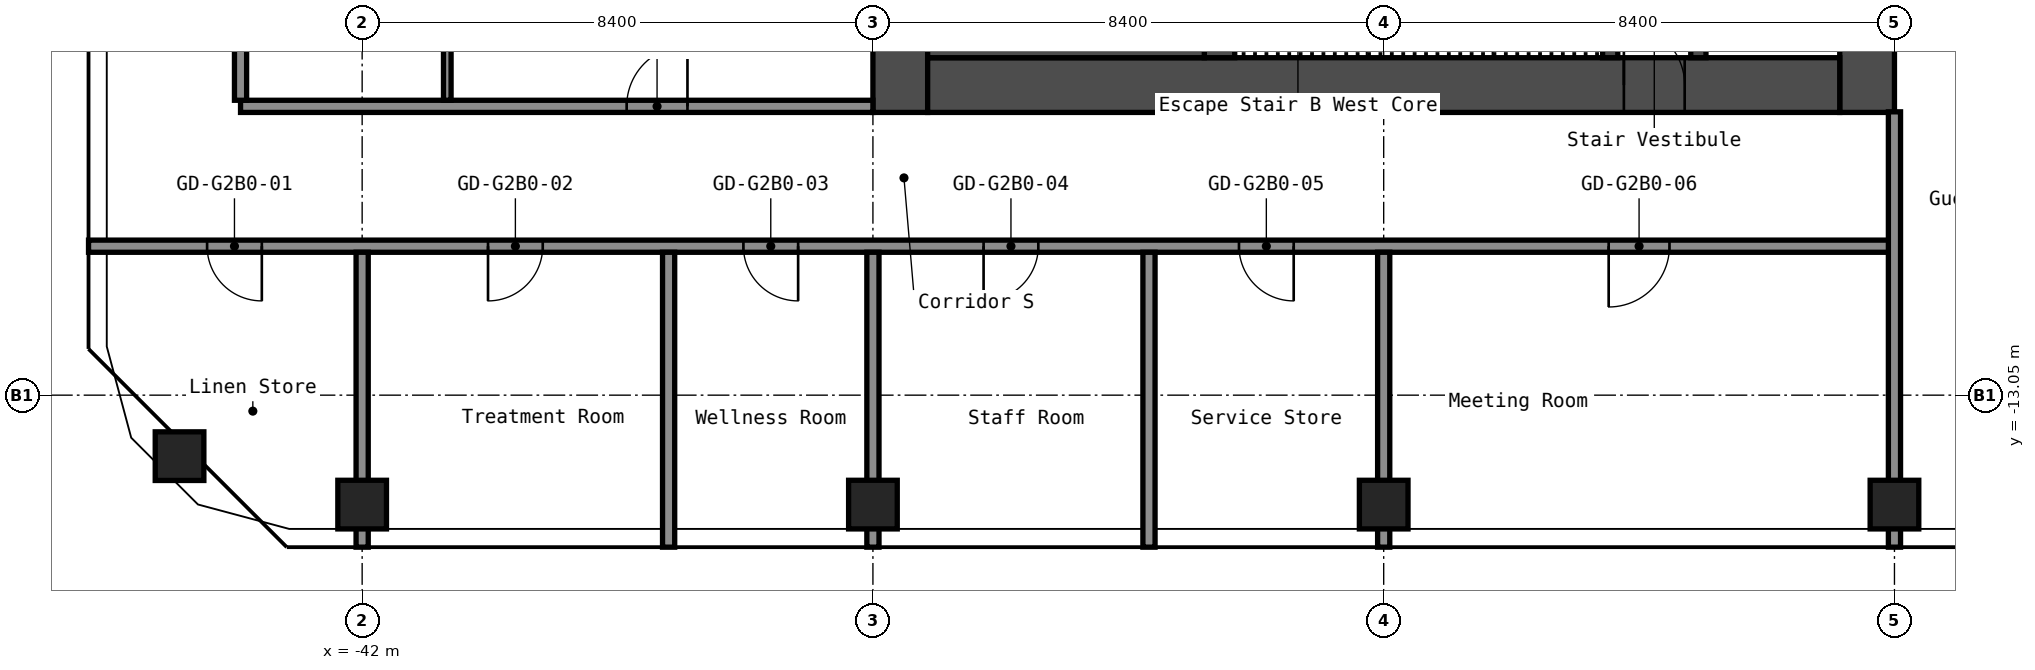
"""IFC4 building model, lengths in metres.
Left out: names, types, materials, properties, quantities, classifications, styles, units other than length and angle.
Written with IfcOpenShell. Run it as: python <this file> out.ifc"""

import sys

from ifc_helpers import new_model, si_unit, direction, frame, frame_2d, origin, origin_2d, place, context, subcontext, project, spatial, rectangle, hollow_rectangle, extrude, element, fill, save


model = new_model("IFC4")
c1 = context("Model", 3, precision=1e-05, world=origin(), true_north=direction((0.0, 1.0)))
c2 = subcontext(c1, "Body", "Model", "MODEL_VIEW")
j1 = project(units=[si_unit("LENGTHUNIT", "METRE"), si_unit("PLANEANGLEUNIT", "RADIAN")], contexts=[c1])
p1 = place(None, origin())
s1 = spatial("IfcSite", under=j1, at=p1, CompositionType="ELEMENT")
p2 = place(p1, origin())
s2 = spatial("IfcBuilding", under=s1, at=p2, CompositionType="ELEMENT")
p3 = place(p2, frame((0.0, 0.0, 78.6)))
s3 = spatial("IfcBuildingStorey", under=s2, at=p3, CompositionType="ELEMENT", Elevation=78.6)
for number, where, z_axis, x_axis in (
    (1, (-45.003, -14.053, 0.0), (0.0, 0.0, 1.0), (1.0, 0.0, 0.0)),
    (2, (-42.0, -14.85, 0.0), (0.0, 0.0, 1.0), (1.0, 0.0, 0.0)),
    (3, (-33.6, -14.85, 0.0), (0.0, 0.0, 1.0), (1.0, 0.0, 0.0)),
    (4, (-25.2, -14.85, 0.0), (0.0, 0.0, 1.0), (1.0, 0.0, 0.0)),
    (5, (-16.8, -14.85, 0.0), (0.0, 0.0, 1.0), (1.0, 0.0, 0.0)),
):
    element("IfcColumn", number, at=place(p3, frame(where, z_axis=z_axis, x_axis=x_axis)), inside=s3, PredefinedType="COLUMN", context=c2, shape_type="SweptSolid", body=[
        extrude(hollow_rectangle(XDim=0.8, YDim=0.8, WallThickness=0.032, at=origin_2d()), origin(), (0.0, 0.0, 1.0), 2.8),
    ])
p4 = place(p3, frame((-17.25, -8.4, 0.0), z_axis=(0.0, 0.0, 1.0), x_axis=(0.0, 1.0, 0.0)))
e6 = element("IfcWall", 6, at=p4, inside=s3, PredefinedType="SHEAR", context=c2, shape_type="SweptSolid", body=[
    extrude(rectangle(XDim=16.8, YDim=0.9, at=frame_2d((8.4, 0.0))), origin(), (0.0, 0.0, 1.0), 2.8),
])
p5 = place(p4, frame((7.6, 0.0, 0.0)))
e7 = element("IfcOpeningElement", 7, at=p5, cuts=e6, PredefinedType="OPENING", context=c2, shape_type="SweptSolid", body=[
    extrude(rectangle(XDim=1.2, YDim=2.1, at=frame_2d((0.6, 1.05))), frame((0.0, 0.46, 0.0), z_axis=(0.0, -1.0, 0.0), x_axis=(1.0, 0.0, 0.0)), (0.0, 0.0, 1.0), 0.92),
])
p6 = place(p3, frame((-33.15, -8.4, 0.0), z_axis=(0.0, 0.0, 1.0), x_axis=(0.0, 1.0, 0.0)))
e8 = element("IfcWall", 8, at=p6, inside=s3, PredefinedType="SHEAR", context=c2, shape_type="SweptSolid", body=[
    extrude(rectangle(XDim=16.8, YDim=0.9, at=frame_2d((8.4, 0.0))), origin(), (0.0, 0.0, 1.0), 2.8),
])
p7 = place(p3, frame((-32.7, -7.95, 0.0), z_axis=(0.0, 0.0, 1.0), x_axis=(1.0, 0.0, 0.0)))
e9 = element("IfcWall", 9, at=p7, inside=s3, PredefinedType="SHEAR", context=c2, shape_type="SweptSolid", body=[
    extrude(rectangle(XDim=15.0, YDim=0.9, at=frame_2d((7.5, 0.0))), origin(), (0.0, 0.0, 1.0), 2.8),
])
p8 = place(p7, frame((11.45, 0.0, 0.0)))
e10 = element("IfcOpeningElement", 10, at=p8, cuts=e9, PredefinedType="OPENING", context=c2, shape_type="SweptSolid", body=[
    extrude(rectangle(XDim=1.0, YDim=2.1, at=frame_2d((0.5, 1.05))), frame((0.0, 0.46, 0.0), z_axis=(0.0, -1.0, 0.0), x_axis=(1.0, 0.0, 0.0)), (0.0, 0.0, 1.0), 0.92),
])
p9 = place(p3, frame((-20.025, -7.5, 0.0), z_axis=(0.0, 0.0, 1.0), x_axis=(0.0, 1.0, 0.0)))
e11 = element("IfcWall", 11, at=p9, inside=s3, PredefinedType="SHEAR", context=c2, shape_type="SweptSolid", body=[
    extrude(rectangle(XDim=6.3, YDim=0.25, at=frame_2d((3.15, 0.0))), origin(), (0.0, 0.0, 1.0), 2.8),
])
p10 = place(p9, frame((2.4, 0.0, 0.0)))
e12 = element("IfcOpeningElement", 12, at=p10, cuts=e11, PredefinedType="OPENING", context=c2, shape_type="SweptSolid", body=[
    extrude(rectangle(XDim=1.0, YDim=2.1, at=frame_2d((0.5, 1.05))), frame((0.0, 0.135, 0.0), z_axis=(0.0, -1.0, 0.0), x_axis=(1.0, 0.0, 0.0)), (0.0, 0.0, 1.0), 0.27),
])
p11 = place(p3, frame((-21.475, -7.5, 0.0), z_axis=(0.0, 0.0, 1.0), x_axis=(0.0, 1.0, 0.0)))
e13 = element("IfcWall", 13, at=p11, inside=s3, PredefinedType="SHEAR", context=c2, shape_type="SweptSolid", body=[
    extrude(rectangle(XDim=3.75, YDim=0.25, at=frame_2d((1.875, 0.0))), origin(), (0.0, 0.0, 1.0), 2.8),
])
p12 = place(p11, frame((1.3, 0.0, 0.0)))
e14 = element("IfcOpeningElement", 14, at=p12, cuts=e13, PredefinedType="OPENING", context=c2, shape_type="SweptSolid", body=[
    extrude(rectangle(XDim=1.2, YDim=2.1, at=frame_2d((0.6, 1.05))), frame((0.0, 0.135, 0.0), z_axis=(0.0, -1.0, 0.0), x_axis=(1.0, 0.0, 0.0)), (0.0, 0.0, 1.0), 0.27),
])
p13 = place(p3, frame((-27.9, -7.5, 0.0), z_axis=(0.0, 0.0, 1.0), x_axis=(0.0, 1.0, 0.0)))
e15 = element("IfcWall", 15, at=p13, inside=s3, PredefinedType="SHEAR", context=c2, shape_type="SweptSolid", body=[
    extrude(rectangle(XDim=3.75, YDim=0.5, at=frame_2d((1.875, 0.0))), origin(), (0.0, 0.0, 1.0), 2.8),
])
p14 = place(p3, frame((-32.7, -6.75, 0.0), z_axis=(0.0, 0.0, 1.0), x_axis=(1.0, 0.0, 0.0)))
e16 = element("IfcWall", 16, at=p14, inside=s3, PredefinedType="SHEAR", context=c2, shape_type="SweptSolid", body=[
    extrude(rectangle(XDim=4.55, YDim=1.5, at=frame_2d((2.275, 0.0))), origin(), (0.0, 0.0, 1.0), 2.8),
])
p15 = place(p3, frame((-46.5, -10.6, 0.0), z_axis=(0.0, 0.0, 1.0), x_axis=(1.0, 0.0, 0.0)))
e17 = element("IfcWall", 17, at=p15, inside=s3, PredefinedType="PARTITIONING", context=c2, shape_type="SweptSolid", body=[
    extrude(rectangle(XDim=29.7, YDim=0.2, at=frame_2d((14.85, 0.0))), origin(), (0.0, 0.0, 1.0), 2.8),
])
p16 = place(p15, frame((1.95, 0.0, 0.0)))
e18 = element("IfcOpeningElement", 18, at=p16, cuts=e17, PredefinedType="OPENING", context=c2, shape_type="SweptSolid", body=[
    extrude(rectangle(XDim=0.9, YDim=2.1, at=frame_2d((0.45, 1.05))), frame((0.0, 0.11, 0.0), z_axis=(0.0, -1.0, 0.0), x_axis=(1.0, 0.0, 0.0)), (0.0, 0.0, 1.0), 0.22),
])
p17 = place(p15, frame((6.57, 0.0, 0.0)))
e19 = element("IfcOpeningElement", 19, at=p17, cuts=e17, PredefinedType="OPENING", context=c2, shape_type="SweptSolid", body=[
    extrude(rectangle(XDim=0.9, YDim=2.1, at=frame_2d((0.45, 1.05))), frame((0.0, 0.11, 0.0), z_axis=(0.0, -1.0, 0.0), x_axis=(1.0, 0.0, 0.0)), (0.0, 0.0, 1.0), 0.22),
])
p18 = place(p15, frame((10.77, 0.0, 0.0)))
e20 = element("IfcOpeningElement", 20, at=p18, cuts=e17, PredefinedType="OPENING", context=c2, shape_type="SweptSolid", body=[
    extrude(rectangle(XDim=0.9, YDim=2.1, at=frame_2d((0.45, 1.05))), frame((0.0, 0.11, 0.0), z_axis=(0.0, -1.0, 0.0), x_axis=(1.0, 0.0, 0.0)), (0.0, 0.0, 1.0), 0.22),
])
p19 = place(p15, frame((14.72, 0.0, 0.0)))
e21 = element("IfcOpeningElement", 21, at=p19, cuts=e17, PredefinedType="OPENING", context=c2, shape_type="SweptSolid", body=[
    extrude(rectangle(XDim=0.9, YDim=2.1, at=frame_2d((0.45, 1.05))), frame((0.0, 0.11, 0.0), z_axis=(0.0, -1.0, 0.0), x_axis=(1.0, 0.0, 0.0)), (0.0, 0.0, 1.0), 0.22),
])
p20 = place(p15, frame((18.92, 0.0, 0.0)))
e22 = element("IfcOpeningElement", 22, at=p20, cuts=e17, PredefinedType="OPENING", context=c2, shape_type="SweptSolid", body=[
    extrude(rectangle(XDim=0.9, YDim=2.1, at=frame_2d((0.45, 1.05))), frame((0.0, 0.11, 0.0), z_axis=(0.0, -1.0, 0.0), x_axis=(1.0, 0.0, 0.0)), (0.0, 0.0, 1.0), 0.22),
])
p21 = place(p15, frame((25.0, 0.0, 0.0)))
e23 = element("IfcOpeningElement", 23, at=p21, cuts=e17, PredefinedType="OPENING", context=c2, shape_type="SweptSolid", body=[
    extrude(rectangle(XDim=1.0, YDim=2.1, at=frame_2d((0.5, 1.05))), frame((0.0, 0.11, 0.0), z_axis=(0.0, -1.0, 0.0), x_axis=(1.0, 0.0, 0.0)), (0.0, 0.0, 1.0), 0.22),
])
p22 = place(p3, frame((-44.0, -8.3, 0.0), z_axis=(0.0, 0.0, 1.0), x_axis=(1.0, 0.0, 0.0)))
e24 = element("IfcWall", 24, at=p22, inside=s3, PredefinedType="PARTITIONING", context=c2, shape_type="SweptSolid", body=[
    extrude(rectangle(XDim=10.4, YDim=0.2, at=frame_2d((5.2, 0.0))), origin(), (0.0, 0.0, 1.0), 2.8),
])
p23 = place(p22, frame((6.35, 0.0, 0.0)))
e25 = element("IfcOpeningElement", 25, at=p23, cuts=e24, PredefinedType="OPENING", context=c2, shape_type="SweptSolid", body=[
    extrude(rectangle(XDim=1.0, YDim=2.1, at=frame_2d((0.5, 1.05))), frame((0.0, 0.11, 0.0), z_axis=(0.0, -1.0, 0.0), x_axis=(1.0, 0.0, 0.0)), (0.0, 0.0, 1.0), 0.22),
])
p24 = place(p3, frame((-44.0, -8.2, 0.0), z_axis=(0.0, 0.0, 1.0), x_axis=(0.0, 1.0, 0.0)))
e26 = element("IfcWall", 26, at=p24, inside=s3, PredefinedType="PARTITIONING", context=c2, shape_type="SweptSolid", body=[
    extrude(rectangle(XDim=16.4, YDim=0.2, at=frame_2d((8.2, 0.0))), origin(), (0.0, 0.0, 1.0), 2.8),
])
p25 = place(p3, frame((-42.0, -15.55, 0.0), z_axis=(0.0, 0.0, 1.0), x_axis=(0.0, 1.0, 0.0)))
e27 = element("IfcWall", 27, at=p25, inside=s3, PredefinedType="PARTITIONING", context=c2, shape_type="SweptSolid", body=[
    extrude(rectangle(XDim=4.85, YDim=0.2, at=frame_2d((2.425, 0.0))), origin(), (0.0, 0.0, 1.0), 2.8),
])
p26 = place(p3, frame((-40.6, -8.2, 0.0), z_axis=(0.0, 0.0, 1.0), x_axis=(0.0, 1.0, 0.0)))
e28 = element("IfcWall", 28, at=p26, inside=s3, PredefinedType="PARTITIONING", context=c2, shape_type="SweptSolid", body=[
    extrude(rectangle(XDim=3.3, YDim=0.125, at=frame_2d((1.65, 0.0))), origin(), (0.0, 0.0, 1.0), 2.8),
])
for number, where, z_axis, x_axis in (
    (29, (-36.96, -15.55, 0.0), (0.0, 0.0, 1.0), (0.0, 1.0, 0.0)),
    (30, (-33.6, -15.55, 0.0), (0.0, 0.0, 1.0), (0.0, 1.0, 0.0)),
    (31, (-29.06, -15.55, 0.0), (0.0, 0.0, 1.0), (0.0, 1.0, 0.0)),
    (32, (-25.2, -15.55, 0.0), (0.0, 0.0, 1.0), (0.0, 1.0, 0.0)),
):
    element("IfcWall", number, at=place(p3, frame(where, z_axis=z_axis, x_axis=x_axis)), inside=s3, PredefinedType="PARTITIONING", context=c2, shape_type="SweptSolid", body=[
        extrude(rectangle(XDim=4.85, YDim=0.2, at=frame_2d((2.425, 0.0))), origin(), (0.0, 0.0, 1.0), 2.8),
    ])
p27 = place(p3, frame((-16.8, -15.55, 0.0), z_axis=(0.0, 0.0, 1.0), x_axis=(0.0, 1.0, 0.0)))
e33 = element("IfcWall", 33, at=p27, inside=s3, PredefinedType="PARTITIONING", context=c2, shape_type="SweptSolid", body=[
    extrude(rectangle(XDim=7.16, YDim=0.2, at=frame_2d((3.58, 0.0))), origin(), (0.0, 0.0, 1.0), 2.8),
])
p28 = place(p8, origin())
e34 = element("IfcDoor", 34, at=p28, inside=s3, OperationType="SINGLE_SWING_RIGHT", PredefinedType="DOOR", context=c2, shape_type="SweptSolid", body=[
    extrude(rectangle(XDim=1.0, YDim=2.1, at=frame_2d((0.5, 1.05))), frame((0.0, 0.025, 0.0), z_axis=(0.0, -1.0, 0.0), x_axis=(1.0, 0.0, 0.0)), (0.0, 0.0, 1.0), 0.05),
])
fill(e10, e34)
p29 = place(p16, origin())
e35 = element("IfcDoor", 35, at=p29, inside=s3, OperationType="SINGLE_SWING_RIGHT", PredefinedType="DOOR", context=c2, shape_type="SweptSolid", body=[
    extrude(rectangle(XDim=0.9, YDim=2.1, at=frame_2d((0.45, 1.05))), frame((0.0, 0.025, 0.0), z_axis=(0.0, -1.0, 0.0), x_axis=(1.0, 0.0, 0.0)), (0.0, 0.0, 1.0), 0.05),
])
fill(e18, e35)
p30 = place(p17, origin())
e36 = element("IfcDoor", 36, at=p30, inside=s3, OperationType="SINGLE_SWING_LEFT", PredefinedType="DOOR", context=c2, shape_type="SweptSolid", body=[
    extrude(rectangle(XDim=0.9, YDim=2.1, at=frame_2d((0.45, 1.05))), frame((0.0, 0.025, 0.0), z_axis=(0.0, -1.0, 0.0), x_axis=(1.0, 0.0, 0.0)), (0.0, 0.0, 1.0), 0.05),
])
fill(e19, e36)
p31 = place(p18, origin())
e37 = element("IfcDoor", 37, at=p31, inside=s3, OperationType="SINGLE_SWING_RIGHT", PredefinedType="DOOR", context=c2, shape_type="SweptSolid", body=[
    extrude(rectangle(XDim=0.9, YDim=2.1, at=frame_2d((0.45, 1.05))), frame((0.0, 0.025, 0.0), z_axis=(0.0, -1.0, 0.0), x_axis=(1.0, 0.0, 0.0)), (0.0, 0.0, 1.0), 0.05),
])
fill(e20, e37)
p32 = place(p19, origin())
e38 = element("IfcDoor", 38, at=p32, inside=s3, OperationType="SINGLE_SWING_LEFT", PredefinedType="DOOR", context=c2, shape_type="SweptSolid", body=[
    extrude(rectangle(XDim=0.9, YDim=2.1, at=frame_2d((0.45, 1.05))), frame((0.0, 0.025, 0.0), z_axis=(0.0, -1.0, 0.0), x_axis=(1.0, 0.0, 0.0)), (0.0, 0.0, 1.0), 0.05),
])
fill(e21, e38)
p33 = place(p20, origin())
e39 = element("IfcDoor", 39, at=p33, inside=s3, OperationType="SINGLE_SWING_RIGHT", PredefinedType="DOOR", context=c2, shape_type="SweptSolid", body=[
    extrude(rectangle(XDim=0.9, YDim=2.1, at=frame_2d((0.45, 1.05))), frame((0.0, 0.025, 0.0), z_axis=(0.0, -1.0, 0.0), x_axis=(1.0, 0.0, 0.0)), (0.0, 0.0, 1.0), 0.05),
])
fill(e22, e39)
p34 = place(p21, origin())
e40 = element("IfcDoor", 40, at=p34, inside=s3, OperationType="SINGLE_SWING_LEFT", PredefinedType="DOOR", context=c2, shape_type="SweptSolid", body=[
    extrude(rectangle(XDim=1.0, YDim=2.1, at=frame_2d((0.5, 1.05))), frame((0.0, 0.025, 0.0), z_axis=(0.0, -1.0, 0.0), x_axis=(1.0, 0.0, 0.0)), (0.0, 0.0, 1.0), 0.05),
])
fill(e23, e40)
p35 = place(p23, origin())
e41 = element("IfcDoor", 41, at=p35, inside=s3, OperationType="SINGLE_SWING_LEFT", PredefinedType="DOOR", context=c2, shape_type="SweptSolid", body=[
    extrude(rectangle(XDim=1.0, YDim=2.1, at=frame_2d((0.5, 1.05))), frame((0.0, 0.025, 0.0), z_axis=(0.0, -1.0, 0.0), x_axis=(1.0, 0.0, 0.0)), (0.0, 0.0, 1.0), 0.05),
])
fill(e25, e41)
save(model, sys.argv[1])
